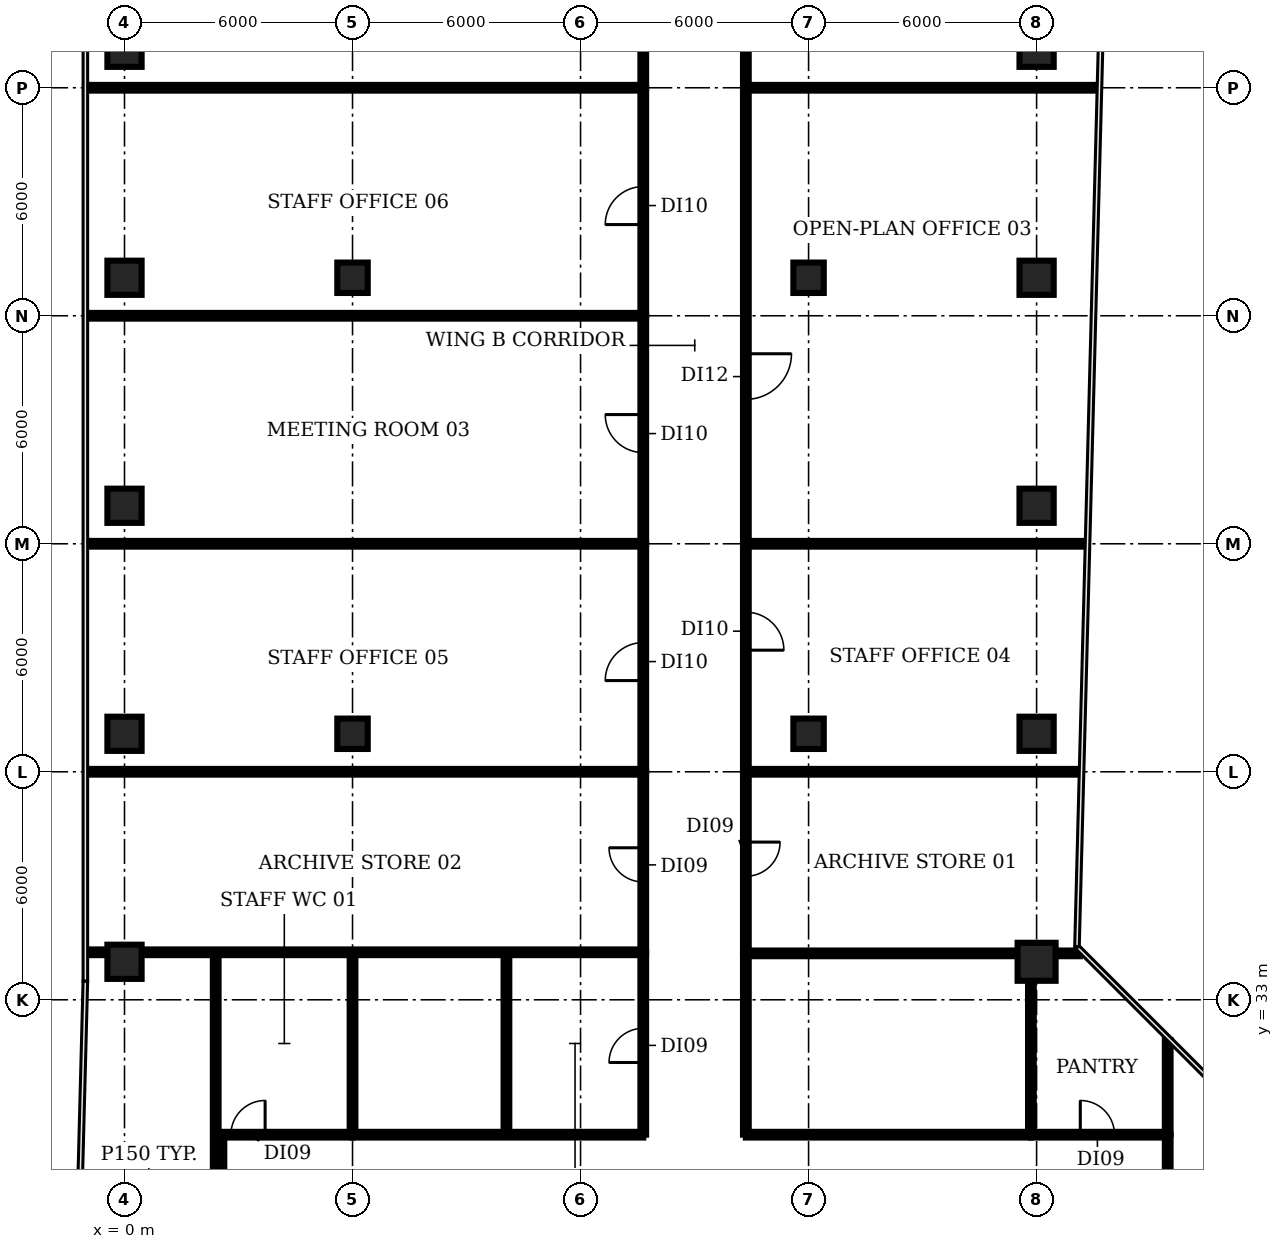
"""IFC4 building model, lengths in metres.
Left out: names, types, materials, properties, quantities, classifications, styles, units other than length and angle.
Written with IfcOpenShell. Run it as: python <this file> out.ifc"""

import sys

from ifc_helpers import new_model, si_unit, direction, frame, frame_2d, origin, origin_2d, place, context, subcontext, project, spatial, rectangle, circle, extrude, element, fill, save


model = new_model("IFC4")
c1 = context("Model", 3, precision=1e-05, world=origin(), true_north=direction((0.0, 1.0)))
c2 = subcontext(c1, "Body", "Model", "MODEL_VIEW")
j1 = project(units=[si_unit("LENGTHUNIT", "METRE"), si_unit("PLANEANGLEUNIT", "RADIAN")], contexts=[c1])
p1 = place(None, origin())
s1 = spatial("IfcSite", under=j1, at=p1, CompositionType="ELEMENT")
p2 = place(p1, origin())
s2 = spatial("IfcBuilding", under=s1, at=p2, CompositionType="ELEMENT")
p3 = place(p2, frame((0.0, 0.0, 117.2)))
s3 = spatial("IfcBuildingStorey", under=s2, at=p3, CompositionType="ELEMENT", Elevation=117.2)
for number, where, z_axis, x_axis in (
    (1, (0.0, 34.0, 0.0), (0.0, 0.0, 1.0), (1.0, 0.0, 0.0)),
    (2, (0.0, 40.0, 0.0), (0.0, 0.0, 1.0), (1.0, 0.0, 0.0)),
    (3, (0.0, 46.0, 0.0), (0.0, 0.0, 1.0), (1.0, 0.0, 0.0)),
    (4, (0.0, 52.0, 0.0), (0.0, 0.0, 1.0), (1.0, 0.0, 0.0)),
    (5, (0.0, 58.0, 0.0), (0.0, 0.0, 1.0), (1.0, 0.0, 0.0)),
):
    element("IfcColumn", number, at=place(p3, frame(where, z_axis=z_axis, x_axis=x_axis)), inside=s3, PredefinedType="COLUMN", context=c2, shape_type="SweptSolid", body=[
        extrude(rectangle(XDim=0.9, YDim=0.9, at=origin_2d()), origin(), (0.0, 0.0, 1.0), 3.85),
    ])
for number, where, z_axis, x_axis in (
    (6, (6.0, 40.0, 0.0), (0.0, 0.0, 1.0), (1.0, 0.0, 0.0)),
    (7, (6.0, 52.0, 0.0), (0.0, 0.0, 1.0), (1.0, 0.0, 0.0)),
    (8, (18.0, 40.0, 0.0), (0.0, 0.0, 1.0), (1.0, 0.0, 0.0)),
    (9, (18.0, 52.0, 0.0), (0.0, 0.0, 1.0), (1.0, 0.0, 0.0)),
):
    element("IfcColumn", number, at=place(p3, frame(where, z_axis=z_axis, x_axis=x_axis)), inside=s3, PredefinedType="COLUMN", context=c2, shape_type="SweptSolid", body=[
        extrude(rectangle(XDim=0.8, YDim=0.8, at=origin_2d()), origin(), (0.0, 0.0, 1.0), 3.85),
    ])
p4 = place(p3, frame((24.0, 34.0, 0.0), z_axis=(0.0, 0.0, 1.0), x_axis=(1.0, 0.0, 0.0)))
e10 = element("IfcColumn", 10, at=p4, inside=s3, PredefinedType="COLUMN", context=c2, shape_type="SweptSolid", body=[
    extrude(circle(Radius=0.5, at=origin_2d()), origin(), (0.0, 0.0, 1.0), 3.85),
])
for number, where, z_axis, x_axis in (
    (11, (24.0, 40.0, 0.0), (0.0, 0.0, 1.0), (1.0, 0.0, 0.0)),
    (12, (24.0, 46.0, 0.0), (0.0, 0.0, 1.0), (1.0, 0.0, 0.0)),
    (13, (24.0, 52.0, 0.0), (0.0, 0.0, 1.0), (1.0, 0.0, 0.0)),
    (14, (24.0, 58.0, 0.0), (0.0, 0.0, 1.0), (1.0, 0.0, 0.0)),
):
    element("IfcColumn", number, at=place(p3, frame(where, z_axis=z_axis, x_axis=x_axis)), inside=s3, PredefinedType="COLUMN", context=c2, shape_type="SweptSolid", body=[
        extrude(rectangle(XDim=0.9, YDim=0.9, at=origin_2d()), origin(), (0.0, 0.0, 1.0), 3.85),
    ])
for number, where, z_axis, x_axis in (
    (15, (-0.98, 34.25, 0.0), (0.0, 0.0, 1.0), (1.0, 0.0, 0.0)),
    (16, (-0.98, 39.0, 0.0), (0.0, 0.0, 1.0), (1.0, 0.0, 0.0)),
    (17, (-0.98, 45.0, 0.0), (0.0, 0.0, 1.0), (1.0, 0.0, 0.0)),
    (18, (-0.98, 51.0, 0.0), (0.0, 0.0, 1.0), (1.0, 0.0, 0.0)),
    (19, (-0.98, 57.0, 0.0), (0.0, 0.0, 1.0), (1.0, 0.0, 0.0)),
):
    element("IfcWall", number, at=place(p3, frame(where, z_axis=z_axis, x_axis=x_axis)), inside=s3, PredefinedType="PARTITIONING", context=c2, shape_type="SweptSolid", body=[
        extrude(rectangle(XDim=14.63, YDim=0.15, at=frame_2d((7.315, 0.0))), origin(), (0.0, 0.0, 1.0), 2.83),
    ])
p5 = place(p3, frame((2.4, 28.25, 0.0), z_axis=(0.0, 0.0, 1.0), x_axis=(0.0, 1.0, 0.0)))
e20 = element("IfcWall", 20, at=p5, inside=s3, PredefinedType="PARTITIONING", context=c2, shape_type="SweptSolid", body=[
    extrude(rectangle(XDim=6.0, YDim=0.15, at=frame_2d((3.0, 0.0))), origin(), (0.0, 0.0, 1.0), 2.83),
])
p6 = place(p3, frame((2.55, 25.55, 0.0), z_axis=(0.0, 0.0, 1.0), x_axis=(0.0, 1.0, 0.0)))
e21 = element("IfcWall", 21, at=p6, inside=s3, PredefinedType="PARTITIONING", context=c2, shape_type="SweptSolid", body=[
    extrude(rectangle(XDim=3.9, YDim=0.15, at=frame_2d((1.95, 0.0))), origin(), (0.0, 0.0, 1.0), 2.83),
])
p7 = place(p3, frame((2.55, 29.45, 0.0), z_axis=(0.0, 0.0, 1.0), x_axis=(1.0, 0.0, 0.0)))
e22 = element("IfcWall", 22, at=p7, inside=s3, PredefinedType="PARTITIONING", context=c2, shape_type="SweptSolid", body=[
    extrude(rectangle(XDim=3.45, YDim=0.15, at=frame_2d((1.725, 0.0))), origin(), (0.0, 0.0, 1.0), 2.83),
])
p8 = place(p7, frame((0.25, 0.0, 0.0)))
e23 = element("IfcOpeningElement", 23, at=p8, cuts=e22, PredefinedType="OPENING", context=c2, shape_type="SweptSolid", body=[
    extrude(rectangle(XDim=0.9, YDim=2.1, at=frame_2d((0.45, 1.05))), frame((0.0, 0.085, 0.0), z_axis=(0.0, -1.0, 0.0), x_axis=(1.0, 0.0, 0.0)), (0.0, 0.0, 1.0), 0.17),
])
p9 = place(p3, frame((6.0, 29.45, 0.0), z_axis=(0.0, 0.0, 1.0), x_axis=(0.0, 1.0, 0.0)))
e24 = element("IfcWall", 24, at=p9, inside=s3, PredefinedType="PARTITIONING", context=c2, shape_type="SweptSolid", body=[
    extrude(rectangle(XDim=4.8, YDim=0.15, at=frame_2d((2.4, 0.0))), origin(), (0.0, 0.0, 1.0), 2.83),
])
p10 = place(p3, frame((6.0, 29.45, 0.0), z_axis=(0.0, 0.0, 1.0), x_axis=(1.0, 0.0, 0.0)))
e25 = element("IfcWall", 25, at=p10, inside=s3, PredefinedType="PARTITIONING", context=c2, shape_type="SweptSolid", body=[
    extrude(rectangle(XDim=7.65, YDim=0.15, at=frame_2d((3.825, 0.0))), origin(), (0.0, 0.0, 1.0), 2.83),
])
p11 = place(p3, frame((10.05, 29.45, 0.0), z_axis=(0.0, 0.0, 1.0), x_axis=(0.0, 1.0, 0.0)))
e26 = element("IfcWall", 26, at=p11, inside=s3, PredefinedType="PARTITIONING", context=c2, shape_type="SweptSolid", body=[
    extrude(rectangle(XDim=4.8, YDim=0.15, at=frame_2d((2.4, 0.0))), origin(), (0.0, 0.0, 1.0), 2.83),
])
p12 = place(p3, frame((13.65, 29.45, 0.0), z_axis=(0.0, 0.0, 1.0), x_axis=(0.0, 1.0, 0.0)))
e27 = element("IfcWall", 27, at=p12, inside=s3, PredefinedType="PARTITIONING", context=c2, shape_type="SweptSolid", body=[
    extrude(rectangle(XDim=4.8, YDim=0.15, at=frame_2d((2.4, 0.0))), origin(), (0.0, 0.0, 1.0), 2.83),
])
p13 = place(p12, frame((1.9, 0.0, 0.0)))
e28 = element("IfcOpeningElement", 28, at=p13, cuts=e27, PredefinedType="OPENING", context=c2, shape_type="SweptSolid", body=[
    extrude(rectangle(XDim=0.9, YDim=2.1, at=frame_2d((0.45, 1.05))), frame((0.0, 0.085, 0.0), z_axis=(0.0, -1.0, 0.0), x_axis=(1.0, 0.0, 0.0)), (0.0, 0.0, 1.0), 0.17),
])
p14 = place(p3, frame((13.65, 34.25, 0.0), z_axis=(0.0, 0.0, 1.0), x_axis=(0.0, 1.0, 0.0)))
e29 = element("IfcWall", 29, at=p14, inside=s3, PredefinedType="PARTITIONING", context=c2, shape_type="SweptSolid", body=[
    extrude(rectangle(XDim=4.75, YDim=0.15, at=frame_2d((2.375, 0.0))), origin(), (0.0, 0.0, 1.0), 2.83),
])
p15 = place(p14, frame((1.85, 0.0, 0.0)))
e30 = element("IfcOpeningElement", 30, at=p15, cuts=e29, PredefinedType="OPENING", context=c2, shape_type="SweptSolid", body=[
    extrude(rectangle(XDim=0.9, YDim=2.1, at=frame_2d((0.45, 1.05))), frame((0.0, 0.085, 0.0), z_axis=(0.0, -1.0, 0.0), x_axis=(1.0, 0.0, 0.0)), (0.0, 0.0, 1.0), 0.17),
])
p16 = place(p3, frame((13.65, 39.0, 0.0), z_axis=(0.0, 0.0, 1.0), x_axis=(0.0, 1.0, 0.0)))
e31 = element("IfcWall", 31, at=p16, inside=s3, PredefinedType="PARTITIONING", context=c2, shape_type="SweptSolid", body=[
    extrude(rectangle(XDim=6.0, YDim=0.15, at=frame_2d((3.0, 0.0))), origin(), (0.0, 0.0, 1.0), 2.83),
])
p17 = place(p16, frame((2.4, 0.0, 0.0)))
e32 = element("IfcOpeningElement", 32, at=p17, cuts=e31, PredefinedType="OPENING", context=c2, shape_type="SweptSolid", body=[
    extrude(rectangle(XDim=1.0, YDim=2.1, at=frame_2d((0.5, 1.05))), frame((0.0, 0.085, 0.0), z_axis=(0.0, -1.0, 0.0), x_axis=(1.0, 0.0, 0.0)), (0.0, 0.0, 1.0), 0.17),
])
p18 = place(p3, frame((13.65, 45.0, 0.0), z_axis=(0.0, 0.0, 1.0), x_axis=(0.0, 1.0, 0.0)))
e33 = element("IfcWall", 33, at=p18, inside=s3, PredefinedType="PARTITIONING", context=c2, shape_type="SweptSolid", body=[
    extrude(rectangle(XDim=6.0, YDim=0.15, at=frame_2d((3.0, 0.0))), origin(), (0.0, 0.0, 1.0), 2.83),
])
p19 = place(p18, frame((2.4, 0.0, 0.0)))
e34 = element("IfcOpeningElement", 34, at=p19, cuts=e33, PredefinedType="OPENING", context=c2, shape_type="SweptSolid", body=[
    extrude(rectangle(XDim=1.0, YDim=2.1, at=frame_2d((0.5, 1.05))), frame((0.0, 0.085, 0.0), z_axis=(0.0, -1.0, 0.0), x_axis=(1.0, 0.0, 0.0)), (0.0, 0.0, 1.0), 0.17),
])
p20 = place(p3, frame((13.65, 51.0, 0.0), z_axis=(0.0, 0.0, 1.0), x_axis=(0.0, 1.0, 0.0)))
e35 = element("IfcWall", 35, at=p20, inside=s3, PredefinedType="PARTITIONING", context=c2, shape_type="SweptSolid", body=[
    extrude(rectangle(XDim=6.0, YDim=0.15, at=frame_2d((3.0, 0.0))), origin(), (0.0, 0.0, 1.0), 2.83),
])
p21 = place(p20, frame((2.4, 0.0, 0.0)))
e36 = element("IfcOpeningElement", 36, at=p21, cuts=e35, PredefinedType="OPENING", context=c2, shape_type="SweptSolid", body=[
    extrude(rectangle(XDim=1.0, YDim=2.1, at=frame_2d((0.5, 1.05))), frame((0.0, 0.085, 0.0), z_axis=(0.0, -1.0, 0.0), x_axis=(1.0, 0.0, 0.0)), (0.0, 0.0, 1.0), 0.17),
])
p22 = place(p3, frame((13.65, 57.0, 0.0), z_axis=(0.0, 0.0, 1.0), x_axis=(0.0, 1.0, 0.0)))
e37 = element("IfcWall", 37, at=p22, inside=s3, PredefinedType="PARTITIONING", context=c2, shape_type="SweptSolid", body=[
    extrude(rectangle(XDim=14.09, YDim=0.15, at=frame_2d((7.045, 0.0))), origin(), (0.0, 0.0, 1.0), 2.83),
])
p23 = place(p22, frame((6.28, 0.0, 0.0)))
e38 = element("IfcOpeningElement", 38, at=p23, cuts=e37, PredefinedType="OPENING", context=c2, shape_type="SweptSolid", body=[
    extrude(rectangle(XDim=1.2, YDim=2.1, at=frame_2d((0.6, 1.05))), frame((0.0, 0.085, 0.0), z_axis=(0.0, -1.0, 0.0), x_axis=(1.0, 0.0, 0.0)), (0.0, 0.0, 1.0), 0.17),
])
p24 = place(p3, frame((16.35, 29.45, 0.0), z_axis=(0.0, 0.0, 1.0), x_axis=(0.0, 1.0, 0.0)))
e39 = element("IfcWall", 39, at=p24, inside=s3, PredefinedType="PARTITIONING", context=c2, shape_type="SweptSolid", body=[
    extrude(rectangle(XDim=4.8, YDim=0.15, at=frame_2d((2.4, 0.0))), origin(), (0.0, 0.0, 1.0), 2.83),
])
p25 = place(p3, frame((16.35, 29.45, 0.0), z_axis=(0.0, 0.0, 1.0), x_axis=(1.0, 0.0, 0.0)))
e40 = element("IfcWall", 40, at=p25, inside=s3, PredefinedType="PARTITIONING", context=c2, shape_type="SweptSolid", body=[
    extrude(rectangle(XDim=7.5, YDim=0.15, at=frame_2d((3.75, 0.0))), origin(), (0.0, 0.0, 1.0), 2.83),
])
p26 = place(p3, frame((16.35, 34.222, 0.0), z_axis=(0.0, 0.0, 1.0), x_axis=(1.0, 0.0, 0.0)))
e41 = element("IfcWall", 41, at=p26, inside=s3, PredefinedType="PARTITIONING", context=c2, shape_type="SweptSolid", body=[
    extrude(rectangle(XDim=8.79, YDim=0.15, at=frame_2d((4.395, 0.0))), origin(), (0.0, 0.0, 1.0), 2.83),
])
p27 = place(p3, frame((16.35, 39.0, 0.0), z_axis=(0.0, 0.0, 1.0), x_axis=(0.0, -1.0, 0.0)))
e42 = element("IfcWall", 42, at=p27, inside=s3, PredefinedType="PARTITIONING", context=c2, shape_type="SweptSolid", body=[
    extrude(rectangle(XDim=4.75, YDim=0.15, at=frame_2d((2.375, 0.0))), origin(), (0.0, 0.0, 1.0), 2.83),
])
p28 = place(p27, frame((1.85, 0.0, 0.0)))
e43 = element("IfcOpeningElement", 43, at=p28, cuts=e42, PredefinedType="OPENING", context=c2, shape_type="SweptSolid", body=[
    extrude(rectangle(XDim=0.9, YDim=2.1, at=frame_2d((0.45, 1.05))), frame((0.0, 0.085, 0.0), z_axis=(0.0, -1.0, 0.0), x_axis=(1.0, 0.0, 0.0)), (0.0, 0.0, 1.0), 0.17),
])
p29 = place(p3, frame((16.35, 39.0, 0.0), z_axis=(0.0, 0.0, 1.0), x_axis=(1.0, 0.0, 0.0)))
e44 = element("IfcWall", 44, at=p29, inside=s3, PredefinedType="PARTITIONING", context=c2, shape_type="SweptSolid", body=[
    extrude(rectangle(XDim=8.78, YDim=0.15, at=frame_2d((4.39, 0.0))), origin(), (0.0, 0.0, 1.0), 2.83),
])
p30 = place(p3, frame((16.35, 45.0, 0.0), z_axis=(0.0, 0.0, 1.0), x_axis=(0.0, -1.0, 0.0)))
e45 = element("IfcWall", 45, at=p30, inside=s3, PredefinedType="PARTITIONING", context=c2, shape_type="SweptSolid", body=[
    extrude(rectangle(XDim=6.0, YDim=0.15, at=frame_2d((3.0, 0.0))), origin(), (0.0, 0.0, 1.0), 2.83),
])
p31 = place(p30, frame((1.8, 0.0, 0.0)))
e46 = element("IfcOpeningElement", 46, at=p31, cuts=e45, PredefinedType="OPENING", context=c2, shape_type="SweptSolid", body=[
    extrude(rectangle(XDim=1.0, YDim=2.1, at=frame_2d((0.5, 1.05))), frame((0.0, 0.085, 0.0), z_axis=(0.0, -1.0, 0.0), x_axis=(1.0, 0.0, 0.0)), (0.0, 0.0, 1.0), 0.17),
])
p32 = place(p3, frame((16.35, 45.0, 0.0), z_axis=(0.0, 0.0, 1.0), x_axis=(1.0, 0.0, 0.0)))
e47 = element("IfcWall", 47, at=p32, inside=s3, PredefinedType="PARTITIONING", context=c2, shape_type="SweptSolid", body=[
    extrude(rectangle(XDim=8.94, YDim=0.15, at=frame_2d((4.47, 0.0))), origin(), (0.0, 0.0, 1.0), 2.83),
])
p33 = place(p3, frame((16.35, 57.0, 0.0), z_axis=(0.0, 0.0, 1.0), x_axis=(0.0, -1.0, 0.0)))
e48 = element("IfcWall", 48, at=p33, inside=s3, PredefinedType="PARTITIONING", context=c2, shape_type="SweptSolid", body=[
    extrude(rectangle(XDim=12.0, YDim=0.15, at=frame_2d((6.0, 0.0))), origin(), (0.0, 0.0, 1.0), 2.83),
])
p34 = place(p33, frame((7.0, 0.0, 0.0)))
e49 = element("IfcOpeningElement", 49, at=p34, cuts=e48, PredefinedType="OPENING", context=c2, shape_type="SweptSolid", body=[
    extrude(rectangle(XDim=1.2, YDim=2.1, at=frame_2d((0.6, 1.05))), frame((0.0, 0.085, 0.0), z_axis=(0.0, -1.0, 0.0), x_axis=(1.0, 0.0, 0.0)), (0.0, 0.0, 1.0), 0.17),
])
p35 = place(p3, frame((16.35, 57.0, 0.0), z_axis=(0.0, 0.0, 1.0), x_axis=(1.0, 0.0, 0.0)))
e50 = element("IfcWall", 50, at=p35, inside=s3, PredefinedType="PARTITIONING", context=c2, shape_type="SweptSolid", body=[
    extrude(rectangle(XDim=9.25, YDim=0.15, at=frame_2d((4.625, 0.0))), origin(), (0.0, 0.0, 1.0), 2.83),
])
p36 = place(p3, frame((16.35, 71.09, 0.0), z_axis=(0.0, 0.0, 1.0), x_axis=(0.0, -1.0, 0.0)))
e51 = element("IfcWall", 51, at=p36, inside=s3, PredefinedType="PARTITIONING", context=c2, shape_type="SweptSolid", body=[
    extrude(rectangle(XDim=14.09, YDim=0.15, at=frame_2d((7.045, 0.0))), origin(), (0.0, 0.0, 1.0), 2.83),
])
p37 = place(p36, frame((9.29, 0.0, 0.0)))
e52 = element("IfcOpeningElement", 52, at=p37, cuts=e51, PredefinedType="OPENING", context=c2, shape_type="SweptSolid", body=[
    extrude(rectangle(XDim=1.0, YDim=2.1, at=frame_2d((0.5, 1.05))), frame((0.0, 0.085, 0.0), z_axis=(0.0, -1.0, 0.0), x_axis=(1.0, 0.0, 0.0)), (0.0, 0.0, 1.0), 0.17),
])
p38 = place(p3, frame((23.85, 29.45, 0.0), z_axis=(0.0, 0.0, 1.0), x_axis=(0.0, 1.0, 0.0)))
e53 = element("IfcWall", 53, at=p38, inside=s3, PredefinedType="PARTITIONING", context=c2, shape_type="SweptSolid", body=[
    extrude(rectangle(XDim=4.8, YDim=0.15, at=frame_2d((2.4, 0.0))), origin(), (0.0, 0.0, 1.0), 2.83),
])
p39 = place(p3, frame((23.85, 29.45, 0.0), z_axis=(0.0, 0.0, 1.0), x_axis=(1.0, 0.0, 0.0)))
e54 = element("IfcWall", 54, at=p39, inside=s3, PredefinedType="PARTITIONING", context=c2, shape_type="SweptSolid", body=[
    extrude(rectangle(XDim=3.6, YDim=0.15, at=frame_2d((1.8, 0.0))), origin(), (0.0, 0.0, 1.0), 2.83),
])
p40 = place(p39, frame((1.3, 0.0, 0.0)))
e55 = element("IfcOpeningElement", 55, at=p40, cuts=e54, PredefinedType="OPENING", context=c2, shape_type="SweptSolid", body=[
    extrude(rectangle(XDim=0.9, YDim=2.1, at=frame_2d((0.45, 1.05))), frame((0.0, 0.085, 0.0), z_axis=(0.0, -1.0, 0.0), x_axis=(1.0, 0.0, 0.0)), (0.0, 0.0, 1.0), 0.17),
])
p41 = place(p3, frame((27.45, 25.55, 0.0), z_axis=(0.0, 0.0, 1.0), x_axis=(0.0, 1.0, 0.0)))
e56 = element("IfcWall", 56, at=p41, inside=s3, PredefinedType="PARTITIONING", context=c2, shape_type="SweptSolid", body=[
    extrude(rectangle(XDim=3.9, YDim=0.15, at=frame_2d((1.95, 0.0))), origin(), (0.0, 0.0, 1.0), 2.83),
])
p42 = place(p3, frame((27.45, 29.45, 0.0), z_axis=(0.0, 0.0, 1.0), x_axis=(0.0, 1.0, 0.0)))
e57 = element("IfcWall", 57, at=p42, inside=s3, PredefinedType="PARTITIONING", context=c2, shape_type="SweptSolid", body=[
    extrude(rectangle(XDim=2.49, YDim=0.15, at=frame_2d((1.245, 0.0))), origin(), (0.0, 0.0, 1.0), 2.83),
])
p43 = place(p8, origin())
e58 = element("IfcDoor", 58, at=p43, inside=s3, OperationType="SINGLE_SWING_RIGHT", PredefinedType="DOOR", context=c2, shape_type="SweptSolid", body=[
    extrude(rectangle(XDim=0.9, YDim=2.1, at=frame_2d((0.45, 1.05))), frame((0.0, 0.025, 0.0), z_axis=(0.0, -1.0, 0.0), x_axis=(1.0, 0.0, 0.0)), (0.0, 0.0, 1.0), 0.05),
])
fill(e23, e58)
p44 = place(p13, origin())
e59 = element("IfcDoor", 59, at=p44, inside=s3, OperationType="SINGLE_SWING_LEFT", PredefinedType="DOOR", context=c2, shape_type="SweptSolid", body=[
    extrude(rectangle(XDim=0.9, YDim=2.1, at=frame_2d((0.45, 1.05))), frame((0.0, 0.025, 0.0), z_axis=(0.0, -1.0, 0.0), x_axis=(1.0, 0.0, 0.0)), (0.0, 0.0, 1.0), 0.05),
])
fill(e28, e59)
p45 = place(p15, origin())
e60 = element("IfcDoor", 60, at=p45, inside=s3, OperationType="SINGLE_SWING_RIGHT", PredefinedType="DOOR", context=c2, shape_type="SweptSolid", body=[
    extrude(rectangle(XDim=0.9, YDim=2.1, at=frame_2d((0.45, 1.05))), frame((0.0, 0.025, 0.0), z_axis=(0.0, -1.0, 0.0), x_axis=(1.0, 0.0, 0.0)), (0.0, 0.0, 1.0), 0.05),
])
fill(e30, e60)
p46 = place(p17, origin())
e61 = element("IfcDoor", 61, at=p46, inside=s3, OperationType="SINGLE_SWING_LEFT", PredefinedType="DOOR", context=c2, shape_type="SweptSolid", body=[
    extrude(rectangle(XDim=1.0, YDim=2.1, at=frame_2d((0.5, 1.05))), frame((0.0, 0.025, 0.0), z_axis=(0.0, -1.0, 0.0), x_axis=(1.0, 0.0, 0.0)), (0.0, 0.0, 1.0), 0.05),
])
fill(e32, e61)
p47 = place(p19, origin())
e62 = element("IfcDoor", 62, at=p47, inside=s3, OperationType="SINGLE_SWING_RIGHT", PredefinedType="DOOR", context=c2, shape_type="SweptSolid", body=[
    extrude(rectangle(XDim=1.0, YDim=2.1, at=frame_2d((0.5, 1.05))), frame((0.0, 0.025, 0.0), z_axis=(0.0, -1.0, 0.0), x_axis=(1.0, 0.0, 0.0)), (0.0, 0.0, 1.0), 0.05),
])
fill(e34, e62)
p48 = place(p21, origin())
e63 = element("IfcDoor", 63, at=p48, inside=s3, OperationType="SINGLE_SWING_LEFT", PredefinedType="DOOR", context=c2, shape_type="SweptSolid", body=[
    extrude(rectangle(XDim=1.0, YDim=2.1, at=frame_2d((0.5, 1.05))), frame((0.0, 0.025, 0.0), z_axis=(0.0, -1.0, 0.0), x_axis=(1.0, 0.0, 0.0)), (0.0, 0.0, 1.0), 0.05),
])
fill(e36, e63)
p49 = place(p28, origin())
e64 = element("IfcDoor", 64, at=p49, inside=s3, OperationType="SINGLE_SWING_LEFT", PredefinedType="DOOR", context=c2, shape_type="SweptSolid", body=[
    extrude(rectangle(XDim=0.9, YDim=2.1, at=frame_2d((0.45, 1.05))), frame((0.0, 0.025, 0.0), z_axis=(0.0, -1.0, 0.0), x_axis=(1.0, 0.0, 0.0)), (0.0, 0.0, 1.0), 0.05),
])
fill(e43, e64)
p50 = place(p31, origin())
e65 = element("IfcDoor", 65, at=p50, inside=s3, OperationType="SINGLE_SWING_RIGHT", PredefinedType="DOOR", context=c2, shape_type="SweptSolid", body=[
    extrude(rectangle(XDim=1.0, YDim=2.1, at=frame_2d((0.5, 1.05))), frame((0.0, 0.025, 0.0), z_axis=(0.0, -1.0, 0.0), x_axis=(1.0, 0.0, 0.0)), (0.0, 0.0, 1.0), 0.05),
])
fill(e46, e65)
p51 = place(p34, origin())
e66 = element("IfcDoor", 66, at=p51, inside=s3, OperationType="SINGLE_SWING_LEFT", PredefinedType="DOOR", context=c2, shape_type="SweptSolid", body=[
    extrude(rectangle(XDim=1.2, YDim=2.1, at=frame_2d((0.6, 1.05))), frame((0.0, 0.025, 0.0), z_axis=(0.0, -1.0, 0.0), x_axis=(1.0, 0.0, 0.0)), (0.0, 0.0, 1.0), 0.05),
])
fill(e49, e66)
p52 = place(p40, origin())
e67 = element("IfcDoor", 67, at=p52, inside=s3, OperationType="SINGLE_SWING_LEFT", PredefinedType="DOOR", context=c2, shape_type="SweptSolid", body=[
    extrude(rectangle(XDim=0.9, YDim=2.1, at=frame_2d((0.45, 1.05))), frame((0.0, 0.025, 0.0), z_axis=(0.0, -1.0, 0.0), x_axis=(1.0, 0.0, 0.0)), (0.0, 0.0, 1.0), 0.05),
])
fill(e55, e67)
save(model, sys.argv[1])
